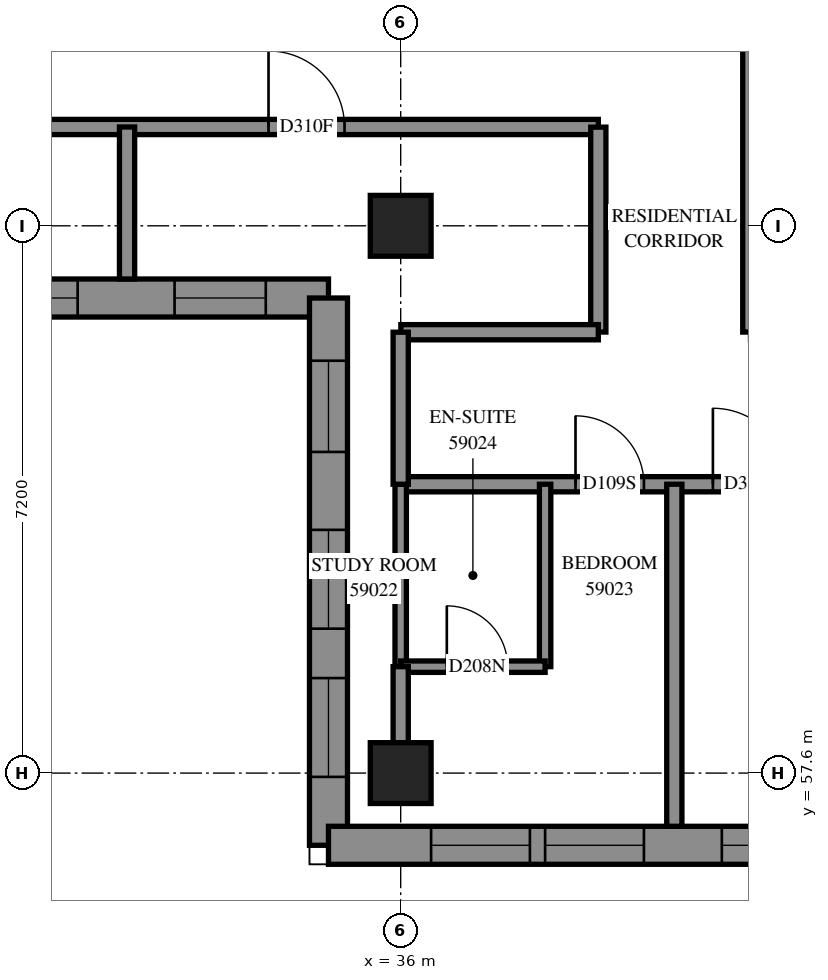
"""IFC4 building model, lengths in metres.
Left out: names, types, materials, properties, quantities, classifications, styles, units other than length and angle.
Written with IfcOpenShell. Run it as: python <this file> out.ifc"""

import sys

from ifc_helpers import new_model, si_unit, direction, frame, frame_2d, origin, origin_2d, place, context, subcontext, project, spatial, polyline, rectangle, outline, extrude, element, fill, save


model = new_model("IFC4")
c1 = context("Model", 3, precision=1e-05, world=origin(), true_north=direction((0.0, 1.0)))
c2 = subcontext(c1, "Body", "Model", "MODEL_VIEW")
j1 = project(units=[si_unit("LENGTHUNIT", "METRE"), si_unit("PLANEANGLEUNIT", "RADIAN")], contexts=[c1])
p1 = place(None, origin())
s1 = spatial("IfcSite", under=j1, at=p1, CompositionType="ELEMENT")
p2 = place(p1, origin())
s2 = spatial("IfcBuilding", under=s1, at=p2, CompositionType="ELEMENT")
p3 = place(p2, frame((0.0, 0.0, 216.8)))
s3 = spatial("IfcBuildingStorey", under=s2, at=p3, CompositionType="ELEMENT", Elevation=216.8)
for number, where, z_axis, x_axis in (
    (1, (36.0, 57.6, 0.0), (0.0, 0.0, 1.0), (1.0, 0.0, 0.0)),
    (2, (36.0, 64.8, 0.0), (0.0, 0.0, 1.0), (1.0, 0.0, 0.0)),
):
    element("IfcColumn", number, at=place(p3, frame(where, z_axis=z_axis, x_axis=x_axis)), inside=s3, PredefinedType="COLUMN", context=c2, shape_type="SweptSolid", body=[
        extrude(rectangle(XDim=0.8, YDim=0.8, at=origin_2d()), origin(), (0.0, 0.0, 1.0), 3.1),
    ])
p4 = place(p3, frame((26.708, 63.85, 0.0), z_axis=(0.0, 0.0, 1.0), x_axis=(1.0, 0.0, 0.0)))
e3 = element("IfcWall", 3, at=p4, inside=s3, PredefinedType="SOLIDWALL", context=c2, shape_type="SweptSolid", body=[
    extrude(outline(polyline([(-0.25, -0.25), (8.092, -0.25), (8.592, 0.25), (0.25, 0.25), (-0.25, -0.25)])), origin(), (0.0, 0.0, 1.0), 3.1),
])
p5 = place(p4, frame((2.242, 0.0, 0.45)))
e4 = element("IfcOpeningElement", 4, at=p5, cuts=e3, PredefinedType="OPENING", context=c2, shape_type="SweptSolid", body=[
    extrude(rectangle(XDim=1.3, YDim=2.5, at=frame_2d((0.65, 1.25))), frame((0.0, 0.26, 0.0), z_axis=(0.0, -1.0, 0.0), x_axis=(1.0, 0.0, 0.0)), (0.0, 0.0, 1.0), 0.52),
])
p6 = place(p4, frame((3.742, 0.0, 0.45)))
e5 = element("IfcOpeningElement", 5, at=p6, cuts=e3, PredefinedType="OPENING", context=c2, shape_type="SweptSolid", body=[
    extrude(rectangle(XDim=1.3, YDim=2.5, at=frame_2d((0.65, 1.25))), frame((0.0, 0.26, 0.0), z_axis=(0.0, -1.0, 0.0), x_axis=(1.0, 0.0, 0.0)), (0.0, 0.0, 1.0), 0.52),
])
p7 = place(p4, frame((0.671, 0.0, 0.45)))
e6 = element("IfcOpeningElement", 6, at=p7, cuts=e3, PredefinedType="OPENING", context=c2, shape_type="SweptSolid", body=[
    extrude(rectangle(XDim=1.2, YDim=2.5, at=frame_2d((0.6, 1.25))), frame((0.0, 0.26, 0.0), z_axis=(0.0, -1.0, 0.0), x_axis=(1.0, 0.0, 0.0)), (0.0, 0.0, 1.0), 0.52),
])
p8 = place(p4, frame((6.317, 0.0, 0.45)))
e7 = element("IfcOpeningElement", 7, at=p8, cuts=e3, PredefinedType="OPENING", context=c2, shape_type="SweptSolid", body=[
    extrude(rectangle(XDim=1.2, YDim=2.5, at=frame_2d((0.6, 1.25))), frame((0.0, 0.26, 0.0), z_axis=(0.0, -1.0, 0.0), x_axis=(1.0, 0.0, 0.0)), (0.0, 0.0, 1.0), 0.52),
])
p9 = place(p3, frame((35.05, 63.85, 0.0), z_axis=(0.0, 0.0, 1.0), x_axis=(0.0, -1.0, 0.0)))
e8 = element("IfcWall", 8, at=p9, inside=s3, PredefinedType="SOLIDWALL", context=c2, shape_type="SweptSolid", body=[
    extrude(outline(polyline([(0.25, -0.25), (7.45, -0.25), (6.95, 0.25), (-0.25, 0.25), (0.25, -0.25)])), origin(), (0.0, 0.0, 1.0), 3.1),
])
p10 = place(p9, frame((3.05, 0.0, 0.45)))
e9 = element("IfcOpeningElement", 9, at=p10, cuts=e8, PredefinedType="OPENING", context=c2, shape_type="SweptSolid", body=[
    extrude(rectangle(XDim=1.3, YDim=2.5, at=frame_2d((0.65, 1.25))), frame((0.0, 0.26, 0.0), z_axis=(0.0, -1.0, 0.0), x_axis=(1.0, 0.0, 0.0)), (0.0, 0.0, 1.0), 0.52),
])
p11 = place(p9, frame((5.0, 0.0, 0.45)))
e10 = element("IfcOpeningElement", 10, at=p11, cuts=e8, PredefinedType="OPENING", context=c2, shape_type="SweptSolid", body=[
    extrude(rectangle(XDim=1.3, YDim=2.5, at=frame_2d((0.65, 1.25))), frame((0.0, 0.26, 0.0), z_axis=(0.0, -1.0, 0.0), x_axis=(1.0, 0.0, 0.0)), (0.0, 0.0, 1.0), 0.52),
])
p12 = place(p9, frame((0.825, 0.0, 0.45)))
e11 = element("IfcOpeningElement", 11, at=p12, cuts=e8, PredefinedType="OPENING", context=c2, shape_type="SweptSolid", body=[
    extrude(rectangle(XDim=1.2, YDim=2.5, at=frame_2d((0.6, 1.25))), frame((0.0, 0.26, 0.0), z_axis=(0.0, -1.0, 0.0), x_axis=(1.0, 0.0, 0.0)), (0.0, 0.0, 1.0), 0.52),
])
p13 = place(p3, frame((35.05, 56.65, 0.0), z_axis=(0.0, 0.0, 1.0), x_axis=(1.0, 0.0, 0.0)))
e12 = element("IfcWall", 12, at=p13, inside=s3, PredefinedType="SOLIDWALL", context=c2, shape_type="SweptSolid", body=[
    extrude(outline(polyline([(-0.25, -0.25), (6.95, -0.25), (7.45, 0.25), (0.25, 0.25), (-0.25, -0.25)])), origin(), (0.0, 0.0, 1.0), 3.1),
])
p14 = place(p13, frame((1.35, 0.0, 0.45)))
e13 = element("IfcOpeningElement", 13, at=p14, cuts=e12, PredefinedType="OPENING", context=c2, shape_type="SweptSolid", body=[
    extrude(rectangle(XDim=1.3, YDim=2.5, at=frame_2d((0.65, 1.25))), frame((0.0, 0.26, 0.0), z_axis=(0.0, -1.0, 0.0), x_axis=(1.0, 0.0, 0.0)), (0.0, 0.0, 1.0), 0.52),
])
p15 = place(p13, frame((2.85, 0.0, 0.45)))
e14 = element("IfcOpeningElement", 14, at=p15, cuts=e12, PredefinedType="OPENING", context=c2, shape_type="SweptSolid", body=[
    extrude(rectangle(XDim=1.3, YDim=2.5, at=frame_2d((0.65, 1.25))), frame((0.0, 0.26, 0.0), z_axis=(0.0, -1.0, 0.0), x_axis=(1.0, 0.0, 0.0)), (0.0, 0.0, 1.0), 0.52),
])
p16 = place(p13, frame((5.175, 0.0, 0.45)))
e15 = element("IfcOpeningElement", 15, at=p16, cuts=e12, PredefinedType="OPENING", context=c2, shape_type="SweptSolid", body=[
    extrude(rectangle(XDim=1.2, YDim=2.5, at=frame_2d((0.6, 1.25))), frame((0.0, 0.26, 0.0), z_axis=(0.0, -1.0, 0.0), x_axis=(1.0, 0.0, 0.0)), (0.0, 0.0, 1.0), 0.52),
])
p17 = place(p3, frame((36.0, 61.4, 0.0), z_axis=(0.0, 0.0, 1.0), x_axis=(1.0, 0.0, 0.0)))
e16 = element("IfcWall", 16, at=p17, inside=s3, PredefinedType="PARTITIONING", context=c2, shape_type="SweptSolid", body=[
    extrude(rectangle(XDim=17.0, YDim=0.2, at=frame_2d((8.5, 0.0))), origin(), (0.0, 0.0, 1.0), 3.1),
])
p18 = place(p17, frame((2.3, 0.0, 0.0)))
e17 = element("IfcOpeningElement", 17, at=p18, cuts=e16, PredefinedType="OPENING", context=c2, shape_type="SweptSolid", body=[
    extrude(rectangle(XDim=0.9, YDim=2.1, at=frame_2d((0.45, 1.05))), frame((0.0, 0.11, 0.0), z_axis=(0.0, -1.0, 0.0), x_axis=(1.0, 0.0, 0.0)), (0.0, 0.0, 1.0), 0.22),
])
p19 = place(p17, frame((4.107, 0.0, 0.0)))
e18 = element("IfcOpeningElement", 18, at=p19, cuts=e16, PredefinedType="OPENING", context=c2, shape_type="SweptSolid", body=[
    extrude(rectangle(XDim=1.0, YDim=2.1, at=frame_2d((0.5, 1.05))), frame((0.0, 0.11, 0.0), z_axis=(0.0, -1.0, 0.0), x_axis=(1.0, 0.0, 0.0)), (0.0, 0.0, 1.0), 0.22),
])
p20 = place(p17, frame((9.5, 0.0, 0.0)))
e19 = element("IfcOpeningElement", 19, at=p20, cuts=e16, PredefinedType="OPENING", context=c2, shape_type="SweptSolid", body=[
    extrude(rectangle(XDim=0.9, YDim=2.1, at=frame_2d((0.45, 1.05))), frame((0.0, 0.11, 0.0), z_axis=(0.0, -1.0, 0.0), x_axis=(1.0, 0.0, 0.0)), (0.0, 0.0, 1.0), 0.22),
])
p21 = place(p17, frame((11.48, 0.0, 0.0)))
e20 = element("IfcOpeningElement", 20, at=p21, cuts=e16, PredefinedType="OPENING", context=c2, shape_type="SweptSolid", body=[
    extrude(rectangle(XDim=1.0, YDim=2.1, at=frame_2d((0.5, 1.05))), frame((0.0, 0.11, 0.0), z_axis=(0.0, -1.0, 0.0), x_axis=(1.0, 0.0, 0.0)), (0.0, 0.0, 1.0), 0.22),
])
p22 = place(p17, frame((15.805, 0.0, 0.0)))
e21 = element("IfcOpeningElement", 21, at=p22, cuts=e16, PredefinedType="OPENING", context=c2, shape_type="SweptSolid", body=[
    extrude(rectangle(XDim=1.0, YDim=2.1, at=frame_2d((0.5, 1.05))), frame((0.0, 0.11, 0.0), z_axis=(0.0, -1.0, 0.0), x_axis=(1.0, 0.0, 0.0)), (0.0, 0.0, 1.0), 0.22),
])
p23 = place(p3, frame((28.802, 66.1, 0.0), z_axis=(0.0, 0.0, 1.0), x_axis=(1.0, 0.0, 0.0)))
e22 = element("IfcWall", 22, at=p23, inside=s3, PredefinedType="PARTITIONING", context=c2, shape_type="SweptSolid", body=[
    extrude(rectangle(XDim=9.798, YDim=0.2, at=frame_2d((4.899, 0.0))), origin(), (0.0, 0.0, 1.0), 3.1),
])
p24 = place(p23, frame((0.449, 0.0, 0.0)))
e23 = element("IfcOpeningElement", 23, at=p24, cuts=e22, PredefinedType="OPENING", context=c2, shape_type="SweptSolid", body=[
    extrude(rectangle(XDim=1.0, YDim=2.1, at=frame_2d((0.5, 1.05))), frame((0.0, 0.11, 0.0), z_axis=(0.0, -1.0, 0.0), x_axis=(1.0, 0.0, 0.0)), (0.0, 0.0, 1.0), 0.22),
])
p25 = place(p23, frame((5.459, 0.0, 0.0)))
e24 = element("IfcOpeningElement", 24, at=p25, cuts=e22, PredefinedType="OPENING", context=c2, shape_type="SweptSolid", body=[
    extrude(rectangle(XDim=1.0, YDim=2.1, at=frame_2d((0.5, 1.05))), frame((0.0, 0.11, 0.0), z_axis=(0.0, -1.0, 0.0), x_axis=(1.0, 0.0, 0.0)), (0.0, 0.0, 1.0), 0.22),
])
p26 = place(p3, frame((40.6, 63.402, 0.0), z_axis=(0.0, 0.0, 1.0), x_axis=(0.0, 1.0, 0.0)))
e25 = element("IfcWall", 25, at=p26, inside=s3, PredefinedType="PARTITIONING", context=c2, shape_type="SweptSolid", body=[
    extrude(rectangle(XDim=4.698, YDim=0.2, at=frame_2d((2.349, 0.0))), origin(), (0.0, 0.0, 1.0), 3.1),
])
p27 = place(p3, frame((39.6, 56.9, 0.0), z_axis=(0.0, 0.0, 1.0), x_axis=(0.0, 1.0, 0.0)))
e26 = element("IfcWall", 26, at=p27, inside=s3, PredefinedType="PARTITIONING", context=c2, shape_type="SweptSolid", body=[
    extrude(rectangle(XDim=4.5, YDim=0.2, at=frame_2d((2.25, 0.0))), origin(), (0.0, 0.0, 1.0), 3.1),
])
p28 = place(p3, frame((38.6, 63.402, 0.0), z_axis=(0.0, 0.0, 1.0), x_axis=(0.0, 1.0, 0.0)))
e27 = element("IfcWall", 27, at=p28, inside=s3, PredefinedType="PARTITIONING", context=c2, shape_type="SweptSolid", body=[
    extrude(rectangle(XDim=2.696, YDim=0.2, at=frame_2d((1.348, 0.0))), origin(), (0.0, 0.0, 1.0), 3.1),
])
p29 = place(p3, frame((36.002, 63.4, 0.0), z_axis=(0.0, 0.0, 1.0), x_axis=(1.0, 0.0, 0.0)))
e28 = element("IfcWall", 28, at=p29, inside=s3, PredefinedType="PARTITIONING", context=c2, shape_type="SweptSolid", body=[
    extrude(rectangle(XDim=2.598, YDim=0.2, at=frame_2d((1.299, 0.0))), origin(), (0.0, 0.0, 1.0), 3.1),
])
p30 = place(p3, frame((37.9, 59.0, 0.0), z_axis=(0.0, 0.0, 1.0), x_axis=(0.0, 1.0, 0.0)))
e29 = element("IfcWall", 29, at=p30, inside=s3, PredefinedType="PARTITIONING", context=c2, shape_type="SweptSolid", body=[
    extrude(rectangle(XDim=2.4, YDim=0.15, at=frame_2d((1.2, 0.0))), origin(), (0.0, 0.0, 1.0), 3.1),
])
p31 = place(p3, frame((36.0, 59.0, 0.0), z_axis=(0.0, 0.0, 1.0), x_axis=(0.0, 1.0, 0.0)))
e30 = element("IfcWall", 30, at=p31, inside=s3, PredefinedType="PARTITIONING", context=c2, shape_type="SweptSolid", body=[
    extrude(rectangle(XDim=2.4, YDim=0.15, at=frame_2d((1.2, 0.0))), origin(), (0.0, 0.0, 1.0), 2.6),
])
p32 = place(p3, frame((36.0, 61.4, 0.0), z_axis=(0.0, 0.0, 1.0), x_axis=(0.0, 1.0, 0.0)))
e31 = element("IfcWall", 31, at=p32, inside=s3, PredefinedType="PARTITIONING", context=c2, shape_type="SweptSolid", body=[
    extrude(rectangle(XDim=2.0, YDim=0.2, at=frame_2d((1.0, 0.0))), origin(), (0.0, 0.0, 1.0), 2.6),
])
p33 = place(p3, frame((32.4, 64.1, 0.0), z_axis=(0.0, 0.0, 1.0), x_axis=(0.0, 1.0, 0.0)))
e32 = element("IfcWall", 32, at=p33, inside=s3, PredefinedType="PARTITIONING", context=c2, shape_type="SweptSolid", body=[
    extrude(rectangle(XDim=2.0, YDim=0.2, at=frame_2d((1.0, 0.0))), origin(), (0.0, 0.0, 1.0), 3.1),
])
p34 = place(p3, frame((36.0, 59.0, 0.0), z_axis=(0.0, 0.0, 1.0), x_axis=(1.0, 0.0, 0.0)))
e33 = element("IfcWall", 33, at=p34, inside=s3, PredefinedType="PARTITIONING", context=c2, shape_type="SweptSolid", body=[
    extrude(rectangle(XDim=1.9, YDim=0.15, at=frame_2d((0.95, 0.0))), origin(), (0.0, 0.0, 1.0), 3.1),
])
p35 = place(p34, frame((0.607, 0.0, 0.0)))
e34 = element("IfcOpeningElement", 34, at=p35, cuts=e33, PredefinedType="OPENING", context=c2, shape_type="SweptSolid", body=[
    extrude(rectangle(XDim=0.8, YDim=2.1, at=frame_2d((0.4, 1.05))), frame((0.0, 0.085, 0.0), z_axis=(0.0, -1.0, 0.0), x_axis=(1.0, 0.0, 0.0)), (0.0, 0.0, 1.0), 0.17),
])
p36 = place(p3, frame((36.0, 58.0, 0.0), z_axis=(0.0, 0.0, 1.0), x_axis=(0.0, 1.0, 0.0)))
e35 = element("IfcWall", 35, at=p36, inside=s3, PredefinedType="PARTITIONING", context=c2, shape_type="SweptSolid", body=[
    extrude(rectangle(XDim=1.0, YDim=0.2, at=frame_2d((0.5, 0.0))), origin(), (0.0, 0.0, 1.0), 2.6),
])
p37 = place(p6, origin())
e36 = element("IfcWindow", 36, at=p37, inside=s3, PartitioningType="SINGLE_PANEL", PredefinedType="WINDOW", context=c2, shape_type="SweptSolid", body=[
    extrude(rectangle(XDim=1.3, YDim=2.5, at=frame_2d((0.65, 1.25))), frame((0.0, 0.18, 0.0), z_axis=(0.0, -1.0, 0.0), x_axis=(1.0, 0.0, 0.0)), (0.0, 0.0, 1.0), 0.06),
])
fill(e5, e36)
p38 = place(p8, origin())
e37 = element("IfcWindow", 37, at=p38, inside=s3, PartitioningType="SINGLE_PANEL", PredefinedType="WINDOW", context=c2, shape_type="SweptSolid", body=[
    extrude(rectangle(XDim=1.2, YDim=2.5, at=frame_2d((0.6, 1.25))), frame((0.0, 0.18, 0.0), z_axis=(0.0, -1.0, 0.0), x_axis=(1.0, 0.0, 0.0)), (0.0, 0.0, 1.0), 0.06),
])
fill(e7, e37)
p39 = place(p10, origin())
e38 = element("IfcWindow", 38, at=p39, inside=s3, PartitioningType="SINGLE_PANEL", PredefinedType="WINDOW", context=c2, shape_type="SweptSolid", body=[
    extrude(rectangle(XDim=1.3, YDim=2.5, at=frame_2d((0.65, 1.25))), frame((0.0, 0.18, 0.0), z_axis=(0.0, -1.0, 0.0), x_axis=(1.0, 0.0, 0.0)), (0.0, 0.0, 1.0), 0.06),
])
fill(e9, e38)
p40 = place(p11, origin())
e39 = element("IfcWindow", 39, at=p40, inside=s3, PartitioningType="SINGLE_PANEL", PredefinedType="WINDOW", context=c2, shape_type="SweptSolid", body=[
    extrude(rectangle(XDim=1.3, YDim=2.5, at=frame_2d((0.65, 1.25))), frame((0.0, 0.18, 0.0), z_axis=(0.0, -1.0, 0.0), x_axis=(1.0, 0.0, 0.0)), (0.0, 0.0, 1.0), 0.06),
])
fill(e10, e39)
p41 = place(p12, origin())
e40 = element("IfcWindow", 40, at=p41, inside=s3, PartitioningType="SINGLE_PANEL", PredefinedType="WINDOW", context=c2, shape_type="SweptSolid", body=[
    extrude(rectangle(XDim=1.2, YDim=2.5, at=frame_2d((0.6, 1.25))), frame((0.0, 0.18, 0.0), z_axis=(0.0, -1.0, 0.0), x_axis=(1.0, 0.0, 0.0)), (0.0, 0.0, 1.0), 0.06),
])
fill(e11, e40)
p42 = place(p14, origin())
e41 = element("IfcWindow", 41, at=p42, inside=s3, PartitioningType="SINGLE_PANEL", PredefinedType="WINDOW", context=c2, shape_type="SweptSolid", body=[
    extrude(rectangle(XDim=1.3, YDim=2.5, at=frame_2d((0.65, 1.25))), frame((0.0, 0.18, 0.0), z_axis=(0.0, -1.0, 0.0), x_axis=(1.0, 0.0, 0.0)), (0.0, 0.0, 1.0), 0.06),
])
fill(e13, e41)
p43 = place(p15, origin())
e42 = element("IfcWindow", 42, at=p43, inside=s3, PartitioningType="SINGLE_PANEL", PredefinedType="WINDOW", context=c2, shape_type="SweptSolid", body=[
    extrude(rectangle(XDim=1.3, YDim=2.5, at=frame_2d((0.65, 1.25))), frame((0.0, 0.18, 0.0), z_axis=(0.0, -1.0, 0.0), x_axis=(1.0, 0.0, 0.0)), (0.0, 0.0, 1.0), 0.06),
])
fill(e14, e42)
p44 = place(p16, origin())
e43 = element("IfcWindow", 43, at=p44, inside=s3, PartitioningType="SINGLE_PANEL", PredefinedType="WINDOW", context=c2, shape_type="SweptSolid", body=[
    extrude(rectangle(XDim=1.2, YDim=2.5, at=frame_2d((0.6, 1.25))), frame((0.0, 0.18, 0.0), z_axis=(0.0, -1.0, 0.0), x_axis=(1.0, 0.0, 0.0)), (0.0, 0.0, 1.0), 0.06),
])
fill(e15, e43)
p45 = place(p25, origin())
e44 = element("IfcDoor", 44, at=p45, inside=s3, OperationType="SINGLE_SWING_RIGHT", PredefinedType="DOOR", context=c2, shape_type="SweptSolid", body=[
    extrude(rectangle(XDim=1.0, YDim=2.1, at=frame_2d((0.5, 1.05))), frame((0.0, 0.025, 0.0), z_axis=(0.0, -1.0, 0.0), x_axis=(1.0, 0.0, 0.0)), (0.0, 0.0, 1.0), 0.05),
])
fill(e24, e44)
p46 = place(p18, origin())
e45 = element("IfcDoor", 45, at=p46, inside=s3, OperationType="SINGLE_SWING_LEFT", PredefinedType="DOOR", context=c2, shape_type="SweptSolid", body=[
    extrude(rectangle(XDim=0.9, YDim=2.1, at=frame_2d((0.45, 1.05))), frame((0.0, 0.025, 0.0), z_axis=(0.0, -1.0, 0.0), x_axis=(1.0, 0.0, 0.0)), (0.0, 0.0, 1.0), 0.05),
])
fill(e17, e45)
p47 = place(p35, origin())
e46 = element("IfcDoor", 46, at=p47, inside=s3, OperationType="SINGLE_SWING_RIGHT", PredefinedType="DOOR", context=c2, shape_type="SweptSolid", body=[
    extrude(rectangle(XDim=0.8, YDim=2.1, at=frame_2d((0.4, 1.05))), frame((0.0, 0.025, 0.0), z_axis=(0.0, -1.0, 0.0), x_axis=(1.0, 0.0, 0.0)), (0.0, 0.0, 1.0), 0.05),
])
fill(e34, e46)
p48 = place(p19, origin())
e47 = element("IfcDoor", 47, at=p48, inside=s3, OperationType="SINGLE_SWING_RIGHT", PredefinedType="DOOR", context=c2, shape_type="SweptSolid", body=[
    extrude(rectangle(XDim=1.0, YDim=2.1, at=frame_2d((0.5, 1.05))), frame((0.0, 0.025, 0.0), z_axis=(0.0, -1.0, 0.0), x_axis=(1.0, 0.0, 0.0)), (0.0, 0.0, 1.0), 0.05),
])
fill(e18, e47)
save(model, sys.argv[1])
